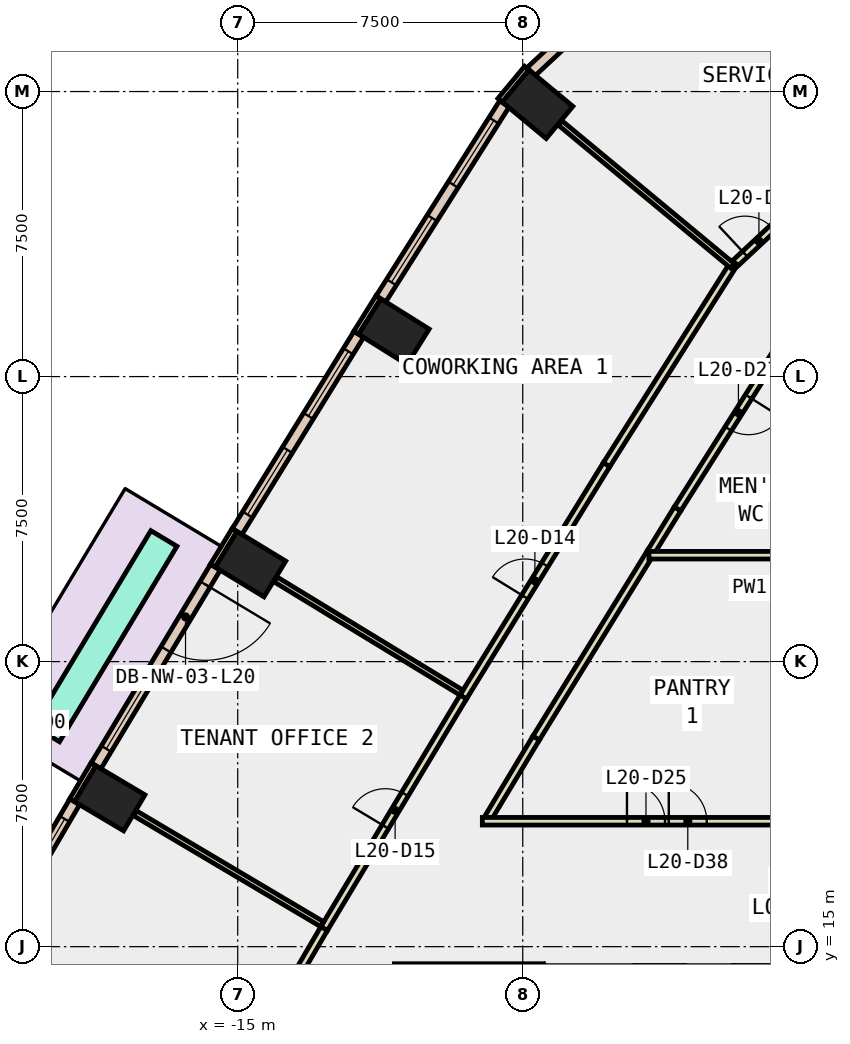
"""IFC4 building model, lengths in metres.
Left out: names, types, materials, properties, quantities, classifications, styles, units other than length and angle.
Written with IfcOpenShell. Run it as: python <this file> out.ifc"""

import sys

from ifc_helpers import new_model, si_unit, direction, frame, frame_2d, origin, origin_2d, place, context, subcontext, project, spatial, rectangle, extrude, element, fill, save


model = new_model("IFC4")
c1 = context("Model", 3, precision=1e-05, world=origin(), true_north=direction((0.0, 1.0)))
c2 = subcontext(c1, "Body", "Model", "MODEL_VIEW")
j1 = project(units=[si_unit("LENGTHUNIT", "METRE"), si_unit("PLANEANGLEUNIT", "RADIAN")], contexts=[c1])
p1 = place(None, origin())
s1 = spatial("IfcSite", under=j1, at=p1, CompositionType="ELEMENT")
p2 = place(p1, origin())
s2 = spatial("IfcBuilding", under=s1, at=p2, CompositionType="ELEMENT")
p3 = place(p2, frame((0.0, 0.0, 95.0)))
s3 = spatial("IfcBuildingStorey", under=s2, at=p3, CompositionType="ELEMENT", Elevation=95.0)
for number, where, z_axis, x_axis in (
    (1, (-7.109, 37.166, -0.4), (0.0, 0.0, 1.0), (0.638, 0.77, 0.0)),
    (2, (-10.89, 31.182, -0.4), (0.0, 0.0, 1.0), (0.53, 0.848, 0.0)),
    (3, (-14.664, 25.065, -0.4), (0.0, 0.0, 1.0), (0.52, 0.854, 0.0)),
    (4, (-18.367, 18.904, -0.4), (0.0, 0.0, 1.0), (0.51, 0.86, 0.0)),
):
    element("IfcColumn", number, at=place(p3, frame(where, z_axis=z_axis, x_axis=x_axis)), inside=s3, PredefinedType="COLUMN", context=c2, shape_type="SweptSolid", body=[
        extrude(rectangle(XDim=1.1, YDim=1.5, at=origin_2d()), origin(), (0.0, 0.0, 1.0), 4.2),
    ])
p4 = place(p3, frame((-7.393, 38.116, 0.0), z_axis=(0.0, 0.0, 1.0), x_axis=(-0.638544483078, -0.769584916127, 0.0)))
e5 = element("IfcWall", 5, at=p4, inside=s3, PredefinedType="STANDARD", context=c2, shape_type="SweptSolid", body=[
    extrude(rectangle(XDim=1.099, YDim=0.15, at=frame_2d((0.55, 0.0))), origin(), (0.0, 0.0, 1.0), 3.8),
])
p5 = place(p3, frame((-11.298, 32.086, 0.0), z_axis=(0.0, 0.0, 1.0), x_axis=(-0.52997899071, -0.848010771987, 0.0)))
e6 = element("IfcWall", 6, at=p5, inside=s3, PredefinedType="STANDARD", context=c2, shape_type="SweptSolid", body=[
    extrude(rectangle(XDim=1.1, YDim=0.15, at=frame_2d((0.55, 0.0))), origin(), (0.0, 0.0, 1.0), 3.8),
])
p6 = place(p3, frame((-15.083, 25.964, 0.0), z_axis=(0.0, 0.0, 1.0), x_axis=(-0.51977099384, -0.854305632641, 0.0)))
e7 = element("IfcWall", 7, at=p6, inside=s3, PredefinedType="STANDARD", context=c2, shape_type="SweptSolid", body=[
    extrude(rectangle(XDim=1.101, YDim=0.15, at=frame_2d((0.55, 0.0))), origin(), (0.0, 0.0, 1.0), 3.8),
])
p7 = place(p3, frame((-18.796, 19.798, 0.0), z_axis=(0.0, 0.0, 1.0), x_axis=(-0.510082245696, -0.860125631885, 0.0)))
e8 = element("IfcWall", 8, at=p7, inside=s3, PredefinedType="STANDARD", context=c2, shape_type="SweptSolid", body=[
    extrude(rectangle(XDim=1.1, YDim=0.15, at=frame_2d((0.55, 0.0))), origin(), (0.0, 0.0, 1.0), 3.8),
])
p8 = place(p3, frame((-4.786, 40.347, 0.0), z_axis=(0.0, 0.0, 1.0), x_axis=(-0.731614451791, -0.681718632525, 0.0)))
e9 = element("IfcWall", 9, at=p8, inside=s3, PredefinedType="STANDARD", context=c2, shape_type="SweptSolid", body=[
    extrude(rectangle(XDim=3.41, YDim=0.3, at=frame_2d((1.705, 0.0))), origin(), (0.0, 0.0, 1.0), 3.8),
])
p9 = place(p8, frame((1.005, 0.0, 0.9)))
e10 = element("IfcOpeningElement", 10, at=p9, cuts=e9, PredefinedType="OPENING", context=c2, shape_type="SweptSolid", body=[
    extrude(rectangle(XDim=1.4, YDim=2.6, at=frame_2d((0.7, 1.3))), frame((0.0, 0.16, 0.0), z_axis=(0.0, -1.0, 0.0), x_axis=(1.0, 0.0, 0.0)), (0.0, 0.0, 1.0), 0.32),
])
p10 = place(p3, frame((-7.982, 37.177, 0.0), z_axis=(0.0, 0.0, 1.0), x_axis=(-0.534869492536, -0.84493468739, 0.0)))
e11 = element("IfcWall", 11, at=p10, inside=s3, PredefinedType="STANDARD", context=c2, shape_type="SweptSolid", body=[
    extrude(rectangle(XDim=6.076, YDim=0.3, at=frame_2d((3.038, 0.0))), origin(), (0.0, 0.0, 1.0), 3.8),
])
p11 = place(p10, frame((0.519, 0.0, 0.9)))
e12 = element("IfcOpeningElement", 12, at=p11, cuts=e11, PredefinedType="OPENING", context=c2, shape_type="SweptSolid", body=[
    extrude(rectangle(XDim=2.0, YDim=2.6, at=frame_2d((1.0, 1.3))), frame((0.0, 0.16, 0.0), z_axis=(0.0, -1.0, 0.0), x_axis=(1.0, 0.0, 0.0)), (0.0, 0.0, 1.0), 0.32),
])
p12 = place(p10, frame((3.557, 0.0, 0.9)))
e13 = element("IfcOpeningElement", 13, at=p12, cuts=e11, PredefinedType="OPENING", context=c2, shape_type="SweptSolid", body=[
    extrude(rectangle(XDim=2.0, YDim=2.6, at=frame_2d((1.0, 1.3))), frame((0.0, 0.16, 0.0), z_axis=(0.0, -1.0, 0.0), x_axis=(1.0, 0.0, 0.0)), (0.0, 0.0, 1.0), 0.32),
])
p13 = place(p3, frame((-11.814, 31.112, 0.0), z_axis=(0.0, 0.0, 1.0), x_axis=(-0.525204788886, -0.850975869065, 0.0)))
e14 = element("IfcWall", 14, at=p13, inside=s3, PredefinedType="STANDARD", context=c2, shape_type="SweptSolid", body=[
    extrude(rectangle(XDim=6.099, YDim=0.3, at=frame_2d((3.049, 0.0))), origin(), (0.0, 0.0, 1.0), 3.8),
])
p14 = place(p13, frame((0.525, 0.0, 0.9)))
e15 = element("IfcOpeningElement", 15, at=p14, cuts=e14, PredefinedType="OPENING", context=c2, shape_type="SweptSolid", body=[
    extrude(rectangle(XDim=2.0, YDim=2.6, at=frame_2d((1.0, 1.3))), frame((0.0, 0.16, 0.0), z_axis=(0.0, -1.0, 0.0), x_axis=(1.0, 0.0, 0.0)), (0.0, 0.0, 1.0), 0.32),
])
p15 = place(p13, frame((3.574, 0.0, 0.9)))
e16 = element("IfcOpeningElement", 16, at=p15, cuts=e14, PredefinedType="OPENING", context=c2, shape_type="SweptSolid", body=[
    extrude(rectangle(XDim=2.0, YDim=2.6, at=frame_2d((1.0, 1.3))), frame((0.0, 0.16, 0.0), z_axis=(0.0, -1.0, 0.0), x_axis=(1.0, 0.0, 0.0)), (0.0, 0.0, 1.0), 0.32),
])
p16 = place(p3, frame((-15.588, 24.984, 0.0), z_axis=(0.0, 0.0, 1.0), x_axis=(-0.515102053092, -0.857128855483, 0.0)))
e17 = element("IfcWall", 17, at=p16, inside=s3, PredefinedType="STANDARD", context=c2, shape_type="SweptSolid", body=[
    extrude(rectangle(XDim=6.098, YDim=0.3, at=frame_2d((3.049, 0.0))), origin(), (0.0, 0.0, 1.0), 3.8),
])
p17 = place(p16, frame((0.525, 0.0, 0.0)))
e18 = element("IfcOpeningElement", 18, at=p17, cuts=e17, PredefinedType="OPENING", context=c2, shape_type="SweptSolid", body=[
    extrude(rectangle(XDim=2.0, YDim=2.4, at=frame_2d((1.0, 1.2))), frame((0.0, 0.16, 0.0), z_axis=(0.0, -1.0, 0.0), x_axis=(1.0, 0.0, 0.0)), (0.0, 0.0, 1.0), 0.32),
])
p18 = place(p16, frame((3.574, 0.0, 0.9)))
e19 = element("IfcOpeningElement", 19, at=p18, cuts=e17, PredefinedType="OPENING", context=c2, shape_type="SweptSolid", body=[
    extrude(rectangle(XDim=2.0, YDim=2.6, at=frame_2d((1.0, 1.3))), frame((0.0, 0.16, 0.0), z_axis=(0.0, -1.0, 0.0), x_axis=(1.0, 0.0, 0.0)), (0.0, 0.0, 1.0), 0.32),
])
p19 = place(p3, frame((-19.289, 18.813, 0.0), z_axis=(0.0, 0.0, 1.0), x_axis=(-0.504998117261, -0.863120444413, 0.0)))
e20 = element("IfcWall", 20, at=p19, inside=s3, PredefinedType="STANDARD", context=c2, shape_type="SweptSolid", body=[
    extrude(rectangle(XDim=6.099, YDim=0.3, at=frame_2d((3.049, 0.0))), origin(), (0.0, 0.0, 1.0), 3.8),
])
p20 = place(p19, frame((0.525, 0.0, 0.9)))
e21 = element("IfcOpeningElement", 21, at=p20, cuts=e20, PredefinedType="OPENING", context=c2, shape_type="SweptSolid", body=[
    extrude(rectangle(XDim=2.0, YDim=2.6, at=frame_2d((1.0, 1.3))), frame((0.0, 0.16, 0.0), z_axis=(0.0, -1.0, 0.0), x_axis=(1.0, 0.0, 0.0)), (0.0, 0.0, 1.0), 0.32),
])
p21 = place(p19, frame((3.574, 0.0, 0.9)))
e22 = element("IfcOpeningElement", 22, at=p21, cuts=e20, PredefinedType="OPENING", context=c2, shape_type="SweptSolid", body=[
    extrude(rectangle(XDim=2.0, YDim=2.6, at=frame_2d((1.0, 1.3))), frame((0.0, 0.16, 0.0), z_axis=(0.0, -1.0, 0.0), x_axis=(1.0, 0.0, 0.0)), (0.0, 0.0, 1.0), 0.32),
])
p22 = place(p3, frame((-16.942, 25.74, 0.0), z_axis=(0.0, 0.0, 1.0), x_axis=(-0.515088117168, -0.857137230292, 0.0)))
e23 = element("IfcWall", 23, at=p22, inside=s3, PredefinedType="STANDARD", context=c2, shape_type="SweptSolid", body=[
    extrude(rectangle(XDim=5.999, YDim=0.8, at=frame_2d((3.0, 0.0))), origin(), (0.0, 0.0, 1.0), 0.8),
])
p23 = place(p3, frame((-4.126, 25.385, 0.0), z_axis=(0.0, 0.0, 1.0), x_axis=(-0.525162244663, -0.851002125016, 0.0)))
e24 = element("IfcWall", 24, at=p23, inside=s3, PredefinedType="PARTITIONING", context=c2, shape_type="SweptSolid", body=[
    extrude(rectangle(XDim=5.754, YDim=0.2, at=frame_2d((2.877, 0.0))), origin(), (0.0, 0.0, 1.0), 3.8),
])
p24 = place(p3, frame((-7.148, 20.488, 0.0), z_axis=(0.0, 0.0, 1.0), x_axis=(-0.515008089027, -0.857185317325, 0.0)))
e25 = element("IfcWall", 25, at=p24, inside=s3, PredefinedType="PARTITIONING", context=c2, shape_type="SweptSolid", body=[
    extrude(rectangle(XDim=2.452, YDim=0.2, at=frame_2d((1.226, 0.0))), origin(), (0.0, 0.0, 1.0), 3.8),
])
p25 = place(p3, frame((-0.221, 31.581, 0.0), z_axis=(0.0, 0.0, 1.0), x_axis=(-0.535034639024, -0.844830122003, 0.0)))
e26 = element("IfcWall", 26, at=p25, inside=s3, PredefinedType="PARTITIONING", context=c2, shape_type="SweptSolid", body=[
    extrude(rectangle(XDim=5.994, YDim=0.2, at=frame_2d((2.997, 0.0))), origin(), (0.0, 0.0, 1.0), 3.8),
])
p26 = place(p25, frame((2.497, 0.0, 0.0)))
e27 = element("IfcOpeningElement", 27, at=p26, cuts=e26, PredefinedType="OPENING", context=c2, shape_type="SweptSolid", body=[
    extrude(rectangle(XDim=1.0, YDim=2.1, at=frame_2d((0.5, 1.05))), frame((0.0, 0.11, 0.0), z_axis=(0.0, -1.0, 0.0), x_axis=(1.0, 0.0, 0.0)), (0.0, 0.0, 1.0), 0.22),
])
p27 = place(p3, frame((-3.428, 26.517, 0.0), z_axis=(0.0, 0.0, 1.0), x_axis=(-0.524824420869, -0.851210507019, 0.0)))
e28 = element("IfcWall", 28, at=p27, inside=s3, PredefinedType="PARTITIONING", context=c2, shape_type="SweptSolid", body=[
    extrude(rectangle(XDim=1.33, YDim=0.2, at=frame_2d((0.665, 0.0))), origin(), (0.0, 0.0, 1.0), 3.8),
])
p28 = place(p3, frame((-1.909, 32.981, 0.0), z_axis=(0.0, 0.0, 1.0), x_axis=(0.731549606095, 0.681788217721, 0.0)))
e29 = element("IfcWall", 29, at=p28, inside=s3, PredefinedType="PARTITIONING", context=c2, shape_type="SweptSolid", body=[
    extrude(rectangle(XDim=1.707, YDim=0.2, at=frame_2d((0.854, 0.0))), origin(), (0.0, 0.0, 1.0), 3.8),
])
p29 = place(p28, frame((0.353, 0.0, 0.0)))
e30 = element("IfcOpeningElement", 30, at=p29, cuts=e29, PredefinedType="OPENING", context=c2, shape_type="SweptSolid", body=[
    extrude(rectangle(XDim=1.0, YDim=2.1, at=frame_2d((0.5, 1.05))), frame((0.0, 0.11, 0.0), z_axis=(0.0, -1.0, 0.0), x_axis=(1.0, 0.0, 0.0)), (0.0, 0.0, 1.0), 0.22),
])
p30 = place(p3, frame((-9.067, 21.568, 0.0), z_axis=(0.0, 0.0, 1.0), x_axis=(0.525131931126, 0.851020831068, 0.0)))
e31 = element("IfcWall", 31, at=p30, inside=s3, PredefinedType="PARTITIONING", context=c2, shape_type="SweptSolid", body=[
    extrude(rectangle(XDim=7.187, YDim=0.2, at=frame_2d((3.593, 0.0))), origin(), (0.0, 0.0, 1.0), 3.8),
])
p31 = place(p30, frame((3.093, 0.0, 0.0)))
e32 = element("IfcOpeningElement", 32, at=p31, cuts=e31, PredefinedType="OPENING", context=c2, shape_type="SweptSolid", body=[
    extrude(rectangle(XDim=1.0, YDim=2.1, at=frame_2d((0.5, 1.05))), frame((0.0, 0.11, 0.0), z_axis=(0.0, -1.0, 0.0), x_axis=(1.0, 0.0, 0.0)), (0.0, 0.0, 1.0), 0.22),
])
p32 = place(p3, frame((-5.293, 27.684, 0.0), z_axis=(0.0, 0.0, 1.0), x_axis=(0.534952324147, 0.844882246759, 0.0)))
e33 = element("IfcWall", 33, at=p32, inside=s3, PredefinedType="PARTITIONING", context=c2, shape_type="SweptSolid", body=[
    extrude(rectangle(XDim=6.288, YDim=0.2, at=frame_2d((3.144, 0.0))), origin(), (0.0, 0.0, 1.0), 3.8),
])
p33 = place(p3, frame((-12.728, 15.473, 0.0), z_axis=(0.0, 0.0, 1.0), x_axis=(0.515010673306, 0.857183764651, 0.0)))
e34 = element("IfcWall", 34, at=p33, inside=s3, PredefinedType="PARTITIONING", context=c2, shape_type="SweptSolid", body=[
    extrude(rectangle(XDim=7.111, YDim=0.2, at=frame_2d((3.555, 0.0))), origin(), (0.0, 0.0, 1.0), 3.8),
])
p34 = place(p33, frame((3.13, 0.0, 0.0)))
e35 = element("IfcOpeningElement", 35, at=p34, cuts=e34, PredefinedType="OPENING", context=c2, shape_type="SweptSolid", body=[
    extrude(rectangle(XDim=1.0, YDim=2.1, at=frame_2d((0.5, 1.05))), frame((0.0, 0.11, 0.0), z_axis=(0.0, -1.0, 0.0), x_axis=(1.0, 0.0, 0.0)), (0.0, 0.0, 1.0), 0.22),
])
p35 = place(p3, frame((-16.281, 9.4, 0.0), z_axis=(0.0, 0.0, 1.0), x_axis=(0.504973069247, 0.863135099121, 0.0)))
e36 = element("IfcWall", 36, at=p35, inside=s3, PredefinedType="PARTITIONING", context=c2, shape_type="SweptSolid", body=[
    extrude(rectangle(XDim=7.036, YDim=0.2, at=frame_2d((3.518, 0.0))), origin(), (0.0, 0.0, 1.0), 3.8),
])
p36 = place(p3, frame((-8.563, 18.3, 0.0), z_axis=(0.0, 0.0, 1.0), x_axis=(1.0, 0.0, 0.0)))
e37 = element("IfcWall", 37, at=p36, inside=s3, PredefinedType="PARTITIONING", context=c2, shape_type="SweptSolid", body=[
    extrude(rectangle(XDim=8.163, YDim=0.2, at=frame_2d((4.082, 0.0))), origin(), (0.0, 0.0, 1.0), 3.8),
])
p37 = place(p36, frame((3.806, 0.0, 0.0)))
e38 = element("IfcOpeningElement", 38, at=p37, cuts=e37, PredefinedType="OPENING", context=c2, shape_type="SweptSolid", body=[
    extrude(rectangle(XDim=1.0, YDim=2.1, at=frame_2d((0.5, 1.05))), frame((0.0, 0.11, 0.0), z_axis=(0.0, -1.0, 0.0), x_axis=(1.0, 0.0, 0.0)), (0.0, 0.0, 1.0), 0.22),
])
p38 = place(p36, frame((4.906, 0.0, 0.0)))
e39 = element("IfcOpeningElement", 39, at=p38, cuts=e37, PredefinedType="OPENING", context=c2, shape_type="SweptSolid", body=[
    extrude(rectangle(XDim=1.0, YDim=2.1, at=frame_2d((0.5, 1.05))), frame((0.0, 0.11, 0.0), z_axis=(0.0, -1.0, 0.0), x_axis=(1.0, 0.0, 0.0)), (0.0, 0.0, 1.0), 0.22),
])
p39 = place(p3, frame((-6.957, 14.45, 0.0), z_axis=(0.0, 0.0, 1.0), x_axis=(-1.0, 0.0, 0.0)))
e40 = element("IfcWall", 40, at=p39, inside=s3, PredefinedType="PARTITIONING", context=c2, shape_type="SweptSolid", body=[
    extrude(rectangle(XDim=3.92, YDim=0.2, at=frame_2d((1.96, 0.0))), origin(), (0.0, 0.0, 1.0), 3.8),
])
p40 = place(p3, frame((-4.179, 25.3, 0.0), z_axis=(0.0, 0.0, 1.0), x_axis=(1.0, 0.0, 0.0)))
e41 = element("IfcWall", 41, at=p40, inside=s3, PredefinedType="PARTITIONING", context=c2, shape_type="SweptSolid", body=[
    extrude(rectangle(XDim=4.079, YDim=0.2, at=frame_2d((2.04, 0.0))), origin(), (0.0, 0.0, 1.0), 3.8),
])
p41 = place(p3, frame((-1.982, 32.913, 0.0), z_axis=(0.0, 0.0, 1.0), x_axis=(-0.769679976891, 0.638429896835, 0.0)))
e42 = element("IfcWall", 42, at=p41, inside=s3, PredefinedType="PARTITIONING", context=c2, shape_type="SweptSolid", body=[
    extrude(rectangle(XDim=5.891, YDim=0.15, at=frame_2d((2.946, 0.0))), origin(), (0.0, 0.0, 1.0), 3.8),
])
p42 = place(p3, frame((-9.113, 21.684, 0.0), z_axis=(0.0, 0.0, 1.0), x_axis=(-0.854075097122, 0.520149717367, 0.0)))
e43 = element("IfcWall", 43, at=p42, inside=s3, PredefinedType="PARTITIONING", context=c2, shape_type="SweptSolid", body=[
    extrude(rectangle(XDim=5.729, YDim=0.15, at=frame_2d((2.865, 0.0))), origin(), (0.0, 0.0, 1.0), 3.8),
])
p43 = place(p3, frame((-12.776, 15.589, 0.0), z_axis=(0.0, 0.0, 1.0), x_axis=(-0.860225086153, 0.509914503768, 0.0)))
e44 = element("IfcWall", 44, at=p43, inside=s3, PredefinedType="PARTITIONING", context=c2, shape_type="SweptSolid", body=[
    extrude(rectangle(XDim=5.73, YDim=0.15, at=frame_2d((2.865, 0.0))), origin(), (0.0, 0.0, 1.0), 3.8),
])
p44 = place(p11, origin())
e45 = element("IfcWindow", 45, at=p44, inside=s3, PartitioningType="SINGLE_PANEL", PredefinedType="WINDOW", context=c2, shape_type="SweptSolid", body=[
    extrude(rectangle(XDim=2.0, YDim=2.6, at=frame_2d((1.0, 1.3))), frame((0.0, 0.03, 0.0), z_axis=(0.0, -1.0, 0.0), x_axis=(1.0, 0.0, 0.0)), (0.0, 0.0, 1.0), 0.06),
])
fill(e12, e45)
p45 = place(p12, origin())
e46 = element("IfcWindow", 46, at=p45, inside=s3, PartitioningType="SINGLE_PANEL", PredefinedType="WINDOW", context=c2, shape_type="SweptSolid", body=[
    extrude(rectangle(XDim=2.0, YDim=2.6, at=frame_2d((1.0, 1.3))), frame((0.0, 0.03, 0.0), z_axis=(0.0, -1.0, 0.0), x_axis=(1.0, 0.0, 0.0)), (0.0, 0.0, 1.0), 0.06),
])
fill(e13, e46)
p46 = place(p14, origin())
e47 = element("IfcWindow", 47, at=p46, inside=s3, PartitioningType="SINGLE_PANEL", PredefinedType="WINDOW", context=c2, shape_type="SweptSolid", body=[
    extrude(rectangle(XDim=2.0, YDim=2.6, at=frame_2d((1.0, 1.3))), frame((0.0, 0.03, 0.0), z_axis=(0.0, -1.0, 0.0), x_axis=(1.0, 0.0, 0.0)), (0.0, 0.0, 1.0), 0.06),
])
fill(e15, e47)
p47 = place(p15, origin())
e48 = element("IfcWindow", 48, at=p47, inside=s3, PartitioningType="SINGLE_PANEL", PredefinedType="WINDOW", context=c2, shape_type="SweptSolid", body=[
    extrude(rectangle(XDim=2.0, YDim=2.6, at=frame_2d((1.0, 1.3))), frame((0.0, 0.03, 0.0), z_axis=(0.0, -1.0, 0.0), x_axis=(1.0, 0.0, 0.0)), (0.0, 0.0, 1.0), 0.06),
])
fill(e16, e48)
p48 = place(p17, origin())
e49 = element("IfcDoor", 49, at=p48, inside=s3, OperationType="SLIDING_TO_LEFT", PredefinedType="DOOR", context=c2, shape_type="SweptSolid", body=[
    extrude(rectangle(XDim=2.0, YDim=2.4, at=frame_2d((1.0, 1.2))), frame((0.0, 0.025, 0.0), z_axis=(0.0, -1.0, 0.0), x_axis=(1.0, 0.0, 0.0)), (0.0, 0.0, 1.0), 0.05),
])
fill(e18, e49)
p49 = place(p18, origin())
e50 = element("IfcWindow", 50, at=p49, inside=s3, PartitioningType="SINGLE_PANEL", PredefinedType="WINDOW", context=c2, shape_type="SweptSolid", body=[
    extrude(rectangle(XDim=2.0, YDim=2.6, at=frame_2d((1.0, 1.3))), frame((0.0, 0.03, 0.0), z_axis=(0.0, -1.0, 0.0), x_axis=(1.0, 0.0, 0.0)), (0.0, 0.0, 1.0), 0.06),
])
fill(e19, e50)
p50 = place(p20, origin())
e51 = element("IfcWindow", 51, at=p50, inside=s3, PartitioningType="SINGLE_PANEL", PredefinedType="WINDOW", context=c2, shape_type="SweptSolid", body=[
    extrude(rectangle(XDim=2.0, YDim=2.6, at=frame_2d((1.0, 1.3))), frame((0.0, 0.03, 0.0), z_axis=(0.0, -1.0, 0.0), x_axis=(1.0, 0.0, 0.0)), (0.0, 0.0, 1.0), 0.06),
])
fill(e21, e51)
p51 = place(p29, origin())
e52 = element("IfcDoor", 52, at=p51, inside=s3, OperationType="SINGLE_SWING_RIGHT", PredefinedType="DOOR", context=c2, shape_type="SweptSolid", body=[
    extrude(rectangle(XDim=1.0, YDim=2.1, at=frame_2d((0.5, 1.05))), frame((0.0, 0.025, 0.0), z_axis=(0.0, -1.0, 0.0), x_axis=(1.0, 0.0, 0.0)), (0.0, 0.0, 1.0), 0.05),
])
fill(e30, e52)
p52 = place(p31, origin())
e53 = element("IfcDoor", 53, at=p52, inside=s3, OperationType="SINGLE_SWING_RIGHT", PredefinedType="DOOR", context=c2, shape_type="SweptSolid", body=[
    extrude(rectangle(XDim=1.0, YDim=2.1, at=frame_2d((0.5, 1.05))), frame((0.0, 0.025, 0.0), z_axis=(0.0, -1.0, 0.0), x_axis=(1.0, 0.0, 0.0)), (0.0, 0.0, 1.0), 0.05),
])
fill(e32, e53)
p53 = place(p34, origin())
e54 = element("IfcDoor", 54, at=p53, inside=s3, OperationType="SINGLE_SWING_LEFT", PredefinedType="DOOR", context=c2, shape_type="SweptSolid", body=[
    extrude(rectangle(XDim=1.0, YDim=2.1, at=frame_2d((0.5, 1.05))), frame((0.0, 0.025, 0.0), z_axis=(0.0, -1.0, 0.0), x_axis=(1.0, 0.0, 0.0)), (0.0, 0.0, 1.0), 0.05),
])
fill(e35, e54)
p54 = place(p37, origin())
e55 = element("IfcDoor", 55, at=p54, inside=s3, OperationType="SINGLE_SWING_RIGHT", PredefinedType="DOOR", context=c2, shape_type="SweptSolid", body=[
    extrude(rectangle(XDim=1.0, YDim=2.1, at=frame_2d((0.5, 1.05))), frame((0.0, 0.025, 0.0), z_axis=(0.0, -1.0, 0.0), x_axis=(1.0, 0.0, 0.0)), (0.0, 0.0, 1.0), 0.05),
])
fill(e38, e55)
p55 = place(p26, origin())
e56 = element("IfcDoor", 56, at=p55, inside=s3, OperationType="SINGLE_SWING_LEFT", PredefinedType="DOOR", context=c2, shape_type="SweptSolid", body=[
    extrude(rectangle(XDim=1.0, YDim=2.1, at=frame_2d((0.5, 1.05))), frame((0.0, 0.025, 0.0), z_axis=(0.0, -1.0, 0.0), x_axis=(1.0, 0.0, 0.0)), (0.0, 0.0, 1.0), 0.05),
])
fill(e27, e56)
p56 = place(p38, origin())
e57 = element("IfcDoor", 57, at=p56, inside=s3, OperationType="SINGLE_SWING_RIGHT", PredefinedType="DOOR", context=c2, shape_type="SweptSolid", body=[
    extrude(rectangle(XDim=1.0, YDim=2.1, at=frame_2d((0.5, 1.05))), frame((0.0, 0.025, 0.0), z_axis=(0.0, -1.0, 0.0), x_axis=(1.0, 0.0, 0.0)), (0.0, 0.0, 1.0), 0.05),
])
fill(e39, e57)
save(model, sys.argv[1])
